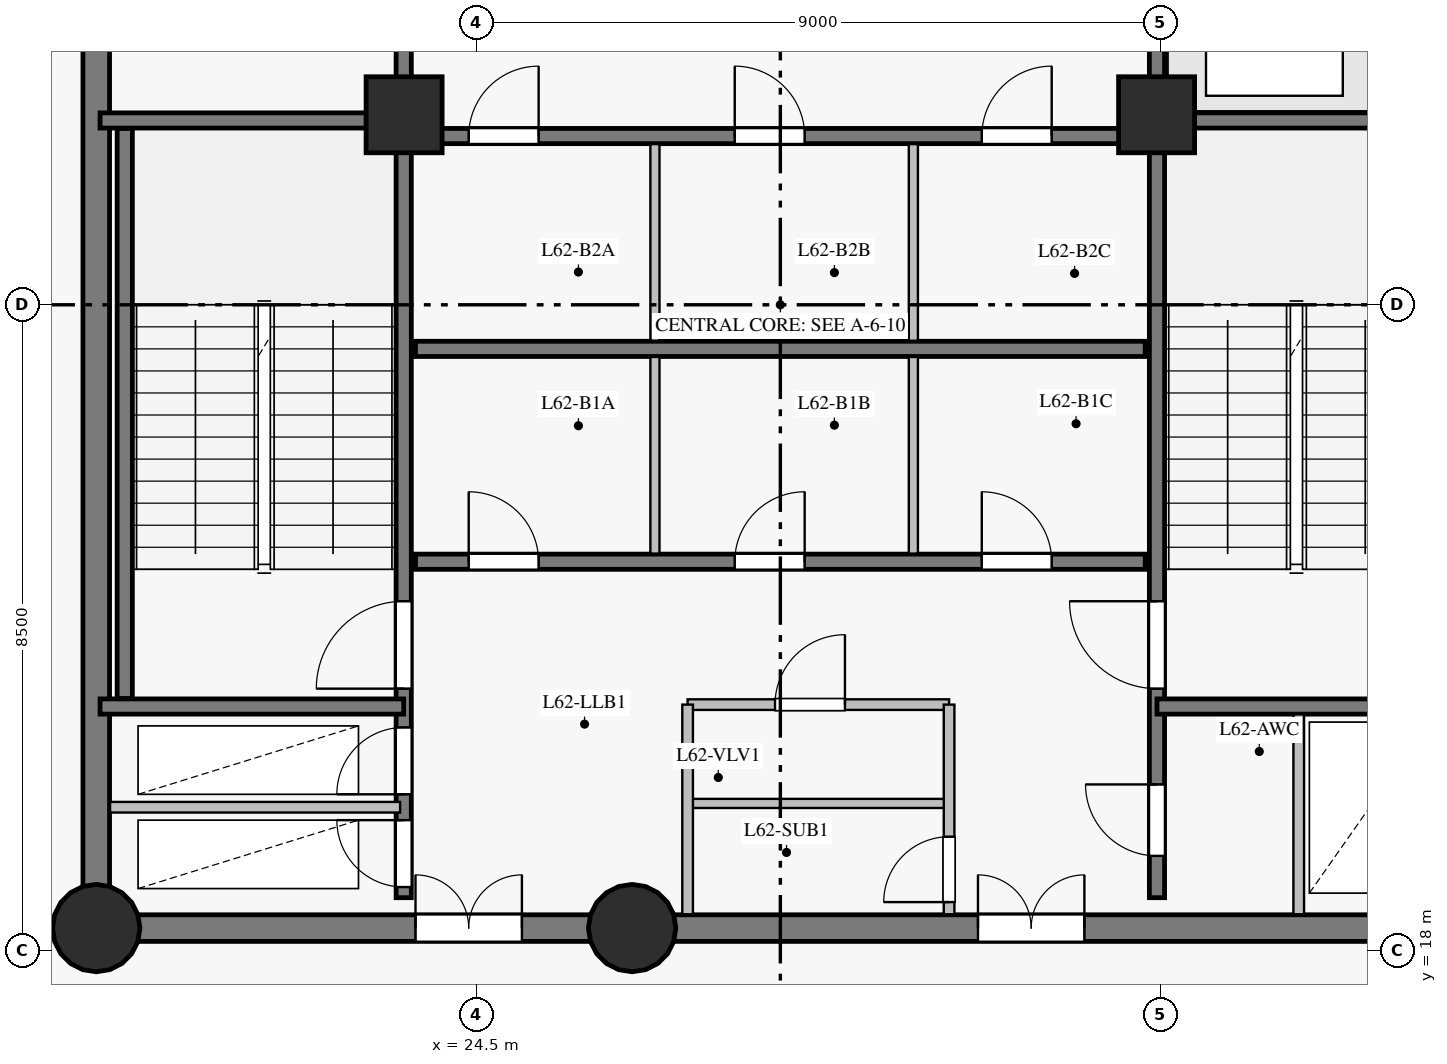
"""IFC4 building model, lengths in metres.
Left out: names, types, materials, properties, quantities, classifications, styles, units other than length and angle.
Written with IfcOpenShell. Run it as: python <this file> out.ifc"""

import sys

from ifc_helpers import new_model, si_unit, direction, frame, frame_2d, origin, origin_with_axes, origin_2d, place, context, subcontext, project, spatial, rectangle, circle, extrude, source, transform, mapped, element, fill, save


model = new_model("IFC4")
c1 = context("Model", 3, precision=1e-05, world=origin(), true_north=direction((0.0, 1.0)))
c2 = subcontext(c1, "Body", "Model", "MODEL_VIEW")
j1 = project(units=[si_unit("LENGTHUNIT", "METRE"), si_unit("PLANEANGLEUNIT", "RADIAN")], contexts=[c1])
p1 = place(None, origin())
s1 = spatial("IfcSite", under=j1, at=p1, CompositionType="ELEMENT")
p2 = place(p1, origin())
s2 = spatial("IfcBuilding", under=s1, at=p2, CompositionType="ELEMENT")
p3 = place(p2, frame((0.0, 0.0, 212.9)))
s3 = spatial("IfcBuildingStorey", under=s2, at=p3, CompositionType="ELEMENT", Elevation=212.9)
p4 = place(p3, frame((19.5, 18.3, 0.0), z_axis=(0.0, 0.0, 1.0), x_axis=(1.0, 0.0, 0.0)))
e1 = element("IfcWall", 1, at=p4, inside=s3, PredefinedType="SHEAR", context=c2, shape_type="SweptSolid", body=[
    extrude(rectangle(XDim=7.05, YDim=0.35, at=frame_2d((3.525, 0.0))), origin(), (0.0, 0.0, 1.0), 3.8),
])
p5 = place(p4, frame((4.2, 0.0, 0.0)))
e2 = element("IfcOpeningElement", 2, at=p5, cuts=e1, PredefinedType="OPENING", context=c2, shape_type="SweptSolid", body=[
    extrude(rectangle(XDim=1.4, YDim=2.2, at=frame_2d((0.7, 1.1))), frame((0.0, 0.185, 0.0), z_axis=(0.0, -1.0, 0.0), x_axis=(1.0, 0.0, 0.0)), (0.0, 0.0, 1.0), 0.37),
])
p6 = place(p3, frame((26.55, 18.3, 0.0), z_axis=(0.0, 0.0, 1.0), x_axis=(1.0, 0.0, 0.0)))
e3 = element("IfcWall", 3, at=p6, inside=s3, PredefinedType="SHEAR", context=c2, shape_type="SweptSolid", body=[
    extrude(rectangle(XDim=10.95, YDim=0.35, at=frame_2d((5.475, 0.0))), origin(), (0.0, 0.0, 1.0), 3.8),
])
p7 = place(p6, frame((4.55, 0.0, 0.0)))
e4 = element("IfcOpeningElement", 4, at=p7, cuts=e3, PredefinedType="OPENING", context=c2, shape_type="SweptSolid", body=[
    extrude(rectangle(XDim=1.4, YDim=2.2, at=frame_2d((0.7, 1.1))), frame((0.0, 0.185, 0.0), z_axis=(0.0, -1.0, 0.0), x_axis=(1.0, 0.0, 0.0)), (0.0, 0.0, 1.0), 0.37),
])
p8 = place(p3, frame((19.5, 34.7, 0.0), z_axis=(0.0, 0.0, 1.0), x_axis=(0.0, -1.0, 0.0)))
e5 = element("IfcWall", 5, at=p8, inside=s3, PredefinedType="SHEAR", context=c2, shape_type="SweptSolid", body=[
    extrude(rectangle(XDim=16.4, YDim=0.35, at=frame_2d((8.2, 0.0))), origin(), (0.0, 0.0, 1.0), 3.8),
])
p9 = place(p8, frame((3.24, 0.0, 0.0)))
e6 = element("IfcOpeningElement", 6, at=p9, cuts=e5, PredefinedType="OPENING", context=c2, shape_type="SweptSolid", body=[
    extrude(rectangle(XDim=1.1, YDim=2.15, at=frame_2d((0.55, 1.075))), frame((0.0, 0.185, 0.0), z_axis=(0.0, -1.0, 0.0), x_axis=(1.0, 0.0, 0.0)), (0.0, 0.0, 1.0), 0.37),
])
m1 = source(origin_with_axes(), c2, "Body", "SweptSolid", [
    extrude(circle(Radius=0.575, at=origin_2d()), origin(), (0.0, 0.0, 1.0), 4.0),
])
for number, where, z_axis, x_axis in (
    (7, (19.5, 18.3, 0.0), (0.0, 0.0, 1.0), (1.0, 0.0, 0.0)),
    (8, (26.55, 18.3, 0.0), (0.0, 0.0, 1.0), (1.0, 0.0, 0.0)),
):
    element("IfcColumn", number, at=place(p3, frame(where, z_axis=z_axis, x_axis=x_axis)), inside=s3, PredefinedType="COLUMN", context=c2, shape_type="MappedRepresentation", body=[
        mapped(m1, transform((0.0, 0.0, 0.0), scale=1.0)),
    ])
m2 = source(origin_with_axes(), c2, "Body", "SweptSolid", [
    extrude(rectangle(XDim=1.0, YDim=1.0, at=origin_2d()), origin(), (0.0, 0.0, 1.0), 4.0),
])
for number, where, z_axis, x_axis in (
    (9, (23.55, 29.0, 0.0), (0.0, 0.0, 1.0), (1.0, 0.0, 0.0)),
    (10, (33.45, 29.0, 0.0), (0.0, 0.0, 1.0), (1.0, 0.0, 0.0)),
):
    element("IfcColumn", number, at=place(p3, frame(where, z_axis=z_axis, x_axis=x_axis)), inside=s3, PredefinedType="COLUMN", context=c2, shape_type="MappedRepresentation", body=[
        mapped(m2, transform((0.0, 0.0, 0.0), scale=1.0)),
    ])
p10 = place(p3, frame((23.545, 18.7, 0.0), z_axis=(0.0, 0.0, 1.0), x_axis=(0.0, 1.0, 0.0)))
e11 = element("IfcWall", 11, at=p10, inside=s3, PredefinedType="SHEAR", context=c2, shape_type="SweptSolid", body=[
    extrude(rectangle(XDim=15.6, YDim=0.2, at=frame_2d((7.8, 0.0))), origin(), (0.0, 0.0, 1.0), 3.8),
])
p11 = place(p10, frame((2.75, 0.0, 0.0)))
e12 = element("IfcOpeningElement", 12, at=p11, cuts=e11, PredefinedType="OPENING", context=c2, shape_type="SweptSolid", body=[
    extrude(rectangle(XDim=1.15, YDim=2.15, at=frame_2d((0.575, 1.075))), frame((0.0, 0.11, 0.0), z_axis=(0.0, -1.0, 0.0), x_axis=(1.0, 0.0, 0.0)), (0.0, 0.0, 1.0), 0.22),
])
p12 = place(p10, frame((0.14, 0.0, 0.0)))
e13 = element("IfcOpeningElement", 13, at=p12, cuts=e11, PredefinedType="OPENING", context=c2, shape_type="SweptSolid", body=[
    extrude(rectangle(XDim=0.88, YDim=2.1, at=frame_2d((0.44, 1.05))), frame((0.0, 0.11, 0.0), z_axis=(0.0, -1.0, 0.0), x_axis=(1.0, 0.0, 0.0)), (0.0, 0.0, 1.0), 0.22),
])
p13 = place(p10, frame((1.36, 0.0, 0.0)))
e14 = element("IfcOpeningElement", 14, at=p13, cuts=e11, PredefinedType="OPENING", context=c2, shape_type="SweptSolid", body=[
    extrude(rectangle(XDim=0.88, YDim=2.1, at=frame_2d((0.44, 1.05))), frame((0.0, 0.11, 0.0), z_axis=(0.0, -1.0, 0.0), x_axis=(1.0, 0.0, 0.0)), (0.0, 0.0, 1.0), 0.22),
])
p14 = place(p10, frame((12.1, 0.0, 0.0)))
e15 = element("IfcOpeningElement", 15, at=p14, cuts=e11, PredefinedType="OPENING", context=c2, shape_type="SweptSolid", body=[
    extrude(rectangle(XDim=1.12, YDim=2.15, at=frame_2d((0.56, 1.075))), frame((0.0, 0.11, 0.0), z_axis=(0.0, -1.0, 0.0), x_axis=(1.0, 0.0, 0.0)), (0.0, 0.0, 1.0), 0.22),
])
p15 = place(p10, frame((14.05, 0.0, 0.0)))
e16 = element("IfcOpeningElement", 16, at=p15, cuts=e11, PredefinedType="OPENING", context=c2, shape_type="SweptSolid", body=[
    extrude(rectangle(XDim=1.12, YDim=2.15, at=frame_2d((0.56, 1.075))), frame((0.0, 0.11, 0.0), z_axis=(0.0, -1.0, 0.0), x_axis=(1.0, 0.0, 0.0)), (0.0, 0.0, 1.0), 0.22),
])
p16 = place(p3, frame((33.455, 18.7, 0.0), z_axis=(0.0, 0.0, 1.0), x_axis=(0.0, 1.0, 0.0)))
e17 = element("IfcWall", 17, at=p16, inside=s3, PredefinedType="SHEAR", context=c2, shape_type="SweptSolid", body=[
    extrude(rectangle(XDim=15.6, YDim=0.2, at=frame_2d((7.8, 0.0))), origin(), (0.0, 0.0, 1.0), 3.8),
])
p17 = place(p16, frame((2.75, 0.0, 0.0)))
e18 = element("IfcOpeningElement", 18, at=p17, cuts=e17, PredefinedType="OPENING", context=c2, shape_type="SweptSolid", body=[
    extrude(rectangle(XDim=1.15, YDim=2.15, at=frame_2d((0.575, 1.075))), frame((0.0, 0.11, 0.0), z_axis=(0.0, -1.0, 0.0), x_axis=(1.0, 0.0, 0.0)), (0.0, 0.0, 1.0), 0.22),
])
p18 = place(p16, frame((0.55, 0.0, 0.0)))
e19 = element("IfcOpeningElement", 19, at=p18, cuts=e17, PredefinedType="OPENING", context=c2, shape_type="SweptSolid", body=[
    extrude(rectangle(XDim=0.94, YDim=2.1, at=frame_2d((0.47, 1.05))), frame((0.0, 0.11, 0.0), z_axis=(0.0, -1.0, 0.0), x_axis=(1.0, 0.0, 0.0)), (0.0, 0.0, 1.0), 0.22),
])
p19 = place(p3, frame((23.7, 23.12, 0.0), z_axis=(0.0, 0.0, 1.0), x_axis=(1.0, 0.0, 0.0)))
e20 = element("IfcWall", 20, at=p19, inside=s3, PredefinedType="SHEAR", context=c2, shape_type="SweptSolid", body=[
    extrude(rectangle(XDim=9.6, YDim=0.2, at=frame_2d((4.8, 0.0))), origin(), (0.0, 0.0, 1.0), 3.8),
])
p20 = place(p19, frame((0.7, 0.0, 0.0)))
e21 = element("IfcOpeningElement", 21, at=p20, cuts=e20, PredefinedType="OPENING", context=c2, shape_type="SweptSolid", body=[
    extrude(rectangle(XDim=0.92, YDim=2.1, at=frame_2d((0.46, 1.05))), frame((0.0, 0.11, 0.0), z_axis=(0.0, -1.0, 0.0), x_axis=(1.0, 0.0, 0.0)), (0.0, 0.0, 1.0), 0.22),
])
p21 = place(p19, frame((4.2, 0.0, 0.0)))
e22 = element("IfcOpeningElement", 22, at=p21, cuts=e20, PredefinedType="OPENING", context=c2, shape_type="SweptSolid", body=[
    extrude(rectangle(XDim=0.92, YDim=2.1, at=frame_2d((0.46, 1.05))), frame((0.0, 0.11, 0.0), z_axis=(0.0, -1.0, 0.0), x_axis=(1.0, 0.0, 0.0)), (0.0, 0.0, 1.0), 0.22),
])
p22 = place(p19, frame((7.45, 0.0, 0.0)))
e23 = element("IfcOpeningElement", 23, at=p22, cuts=e20, PredefinedType="OPENING", context=c2, shape_type="SweptSolid", body=[
    extrude(rectangle(XDim=0.92, YDim=2.1, at=frame_2d((0.46, 1.05))), frame((0.0, 0.11, 0.0), z_axis=(0.0, -1.0, 0.0), x_axis=(1.0, 0.0, 0.0)), (0.0, 0.0, 1.0), 0.22),
])
p23 = place(p3, frame((23.7, 25.92, 0.0), z_axis=(0.0, 0.0, 1.0), x_axis=(1.0, 0.0, 0.0)))
e24 = element("IfcWall", 24, at=p23, inside=s3, PredefinedType="SHEAR", context=c2, shape_type="SweptSolid", body=[
    extrude(rectangle(XDim=9.6, YDim=0.2, at=frame_2d((4.8, 0.0))), origin(), (0.0, 0.0, 1.0), 3.8),
])
p24 = place(p3, frame((23.7, 28.72, 0.0), z_axis=(0.0, 0.0, 1.0), x_axis=(1.0, 0.0, 0.0)))
e25 = element("IfcWall", 25, at=p24, inside=s3, PredefinedType="SHEAR", context=c2, shape_type="SweptSolid", body=[
    extrude(rectangle(XDim=9.6, YDim=0.2, at=frame_2d((4.8, 0.0))), origin(), (0.0, 0.0, 1.0), 3.8),
])
p25 = place(p24, frame((0.7, 0.0, 0.0)))
e26 = element("IfcOpeningElement", 26, at=p25, cuts=e25, PredefinedType="OPENING", context=c2, shape_type="SweptSolid", body=[
    extrude(rectangle(XDim=0.92, YDim=2.1, at=frame_2d((0.46, 1.05))), frame((0.0, 0.11, 0.0), z_axis=(0.0, -1.0, 0.0), x_axis=(1.0, 0.0, 0.0)), (0.0, 0.0, 1.0), 0.22),
])
p26 = place(p24, frame((4.2, 0.0, 0.0)))
e27 = element("IfcOpeningElement", 27, at=p26, cuts=e25, PredefinedType="OPENING", context=c2, shape_type="SweptSolid", body=[
    extrude(rectangle(XDim=0.92, YDim=2.1, at=frame_2d((0.46, 1.05))), frame((0.0, 0.11, 0.0), z_axis=(0.0, -1.0, 0.0), x_axis=(1.0, 0.0, 0.0)), (0.0, 0.0, 1.0), 0.22),
])
p27 = place(p24, frame((7.45, 0.0, 0.0)))
e28 = element("IfcOpeningElement", 28, at=p27, cuts=e25, PredefinedType="OPENING", context=c2, shape_type="SweptSolid", body=[
    extrude(rectangle(XDim=0.92, YDim=2.1, at=frame_2d((0.46, 1.05))), frame((0.0, 0.11, 0.0), z_axis=(0.0, -1.0, 0.0), x_axis=(1.0, 0.0, 0.0)), (0.0, 0.0, 1.0), 0.22),
])
p28 = place(p3, frame((19.875, 21.32, 0.0), z_axis=(0.0, 0.0, 1.0), x_axis=(0.0, 1.0, 0.0)))
e29 = element("IfcWall", 29, at=p28, inside=s3, PredefinedType="SHEAR", context=c2, shape_type="SweptSolid", body=[
    extrude(rectangle(XDim=7.5, YDim=0.2, at=frame_2d((3.75, 0.0))), origin(), (0.0, 0.0, 1.0), 3.8),
])
for number, where, z_axis, x_axis in (
    (30, (33.455, 21.215, 0.0), (0.0, 0.0, 1.0), (1.0, 0.0, 0.0)),
    (31, (33.455, 28.925, 0.0), (0.0, 0.0, 1.0), (1.0, 0.0, 0.0)),
    (32, (19.55, 21.215, 0.0), (0.0, 0.0, 1.0), (1.0, 0.0, 0.0)),
    (33, (19.55, 28.925, 0.0), (0.0, 0.0, 1.0), (1.0, 0.0, 0.0)),
):
    element("IfcWall", number, at=place(p3, frame(where, z_axis=z_axis, x_axis=x_axis)), inside=s3, PredefinedType="SHEAR", context=c2, shape_type="SweptSolid", body=[
        extrude(rectangle(XDim=3.995, YDim=0.2, at=frame_2d((1.998, 0.0))), origin(), (0.0, 0.0, 1.0), 3.8),
    ])
p29 = place(p3, frame((19.682, 19.89, 0.0), z_axis=(0.0, 0.0, 1.0), x_axis=(1.0, 0.0, 0.0)))
e34 = element("IfcWall", 34, at=p29, inside=s3, PredefinedType="PARTITIONING", context=c2, shape_type="SweptSolid", body=[
    extrude(rectangle(XDim=3.815, YDim=0.14, at=frame_2d((1.908, 0.0))), origin(), (0.0, 0.0, 1.0), 3.8),
])
p30 = place(p3, frame((27.28, 21.24, 0.0), z_axis=(0.0, 0.0, 1.0), x_axis=(1.0, 0.0, 0.0)))
e35 = element("IfcWall", 35, at=p30, inside=s3, PredefinedType="PARTITIONING", context=c2, shape_type="SweptSolid", body=[
    extrude(rectangle(XDim=3.44, YDim=0.14, at=frame_2d((1.72, 0.0))), origin(), (0.0, 0.0, 1.0), 3.8),
])
p31 = place(p30, frame((1.15, 0.0, 0.0)))
e36 = element("IfcOpeningElement", 36, at=p31, cuts=e35, PredefinedType="OPENING", context=c2, shape_type="SweptSolid", body=[
    extrude(rectangle(XDim=0.92, YDim=2.1, at=frame_2d((0.46, 1.05))), frame((0.0, 0.08, 0.0), z_axis=(0.0, -1.0, 0.0), x_axis=(1.0, 0.0, 0.0)), (0.0, 0.0, 1.0), 0.16),
])
p32 = place(p3, frame((27.28, 19.94, 0.0), z_axis=(0.0, 0.0, 1.0), x_axis=(1.0, 0.0, 0.0)))
e37 = element("IfcWall", 37, at=p32, inside=s3, PredefinedType="PARTITIONING", context=c2, shape_type="SweptSolid", body=[
    extrude(rectangle(XDim=3.44, YDim=0.12, at=frame_2d((1.72, 0.0))), origin(), (0.0, 0.0, 1.0), 3.8),
])
p33 = place(p3, frame((27.28, 18.482, 0.0), z_axis=(0.0, 0.0, 1.0), x_axis=(0.0, 1.0, 0.0)))
e38 = element("IfcWall", 38, at=p33, inside=s3, PredefinedType="PARTITIONING", context=c2, shape_type="SweptSolid", body=[
    extrude(rectangle(XDim=2.758, YDim=0.14, at=frame_2d((1.379, 0.0))), origin(), (0.0, 0.0, 1.0), 3.8),
])
p34 = place(p3, frame((30.72, 18.482, 0.0), z_axis=(0.0, 0.0, 1.0), x_axis=(0.0, 1.0, 0.0)))
e39 = element("IfcWall", 39, at=p34, inside=s3, PredefinedType="PARTITIONING", context=c2, shape_type="SweptSolid", body=[
    extrude(rectangle(XDim=2.758, YDim=0.14, at=frame_2d((1.379, 0.0))), origin(), (0.0, 0.0, 1.0), 3.8),
])
p35 = place(p34, frame((0.16, 0.0, 0.0)))
e40 = element("IfcOpeningElement", 40, at=p35, cuts=e39, PredefinedType="OPENING", context=c2, shape_type="SweptSolid", body=[
    extrude(rectangle(XDim=0.86, YDim=2.1, at=frame_2d((0.43, 1.05))), frame((0.0, 0.08, 0.0), z_axis=(0.0, -1.0, 0.0), x_axis=(1.0, 0.0, 0.0)), (0.0, 0.0, 1.0), 0.16),
])
for number, where, z_axis, x_axis in (
    (41, (26.85, 23.227, 0.0), (0.0, 0.0, 1.0), (0.0, 1.0, 0.0)),
    (42, (30.25, 23.227, 0.0), (0.0, 0.0, 1.0), (0.0, 1.0, 0.0)),
    (43, (26.85, 26.027, 0.0), (0.0, 0.0, 1.0), (0.0, 1.0, 0.0)),
    (44, (30.25, 26.027, 0.0), (0.0, 0.0, 1.0), (0.0, 1.0, 0.0)),
):
    element("IfcWall", number, at=place(p3, frame(where, z_axis=z_axis, x_axis=x_axis)), inside=s3, PredefinedType="PARTITIONING", context=c2, shape_type="SweptSolid", body=[
        extrude(rectangle(XDim=2.587, YDim=0.12, at=frame_2d((1.293, 0.0))), origin(), (0.0, 0.0, 1.0), 3.8),
    ])
p36 = place(p3, frame((35.32, 18.482, 0.0), z_axis=(0.0, 0.0, 1.0), x_axis=(0.0, 1.0, 0.0)))
e45 = element("IfcWall", 45, at=p36, inside=s3, PredefinedType="PARTITIONING", context=c2, shape_type="SweptSolid", body=[
    extrude(rectangle(XDim=2.629, YDim=0.14, at=frame_2d((1.314, 0.0))), origin(), (0.0, 0.0, 1.0), 3.8),
])
m3 = source(origin_with_axes(), c2, "Body", "SweptSolid", [
    extrude(rectangle(XDim=1.15, YDim=2.15, at=frame_2d((0.575, 1.075))), frame((0.0, 0.025, 0.0), z_axis=(0.0, -1.0, 0.0), x_axis=(1.0, 0.0, 0.0)), (0.0, 0.0, 1.0), 0.05),
])
p37 = place(p11, origin())
e46 = element("IfcDoor", 46, at=p37, inside=s3, OperationType="SINGLE_SWING_LEFT", PredefinedType="DOOR", context=c2, shape_type="MappedRepresentation", body=[
    mapped(m3, transform((0.0, 0.0, 0.0), scale=1.0)),
])
fill(e12, e46)
p38 = place(p17, origin())
e47 = element("IfcDoor", 47, at=p38, inside=s3, OperationType="SINGLE_SWING_RIGHT", PredefinedType="DOOR", context=c2, shape_type="MappedRepresentation", body=[
    mapped(m3, transform((0.0, 0.0, 0.0), scale=1.0)),
])
fill(e18, e47)
m4 = source(origin_with_axes(), c2, "Body", "SweptSolid", [
    extrude(rectangle(XDim=0.88, YDim=2.1, at=frame_2d((0.44, 1.05))), frame((0.0, 0.025, 0.0), z_axis=(0.0, -1.0, 0.0), x_axis=(1.0, 0.0, 0.0)), (0.0, 0.0, 1.0), 0.05),
])
p39 = place(p12, origin())
e48 = element("IfcDoor", 48, at=p39, inside=s3, OperationType="SINGLE_SWING_RIGHT", PredefinedType="DOOR", context=c2, shape_type="MappedRepresentation", body=[
    mapped(m4, transform((0.0, 0.0, 0.0), scale=1.0)),
])
fill(e13, e48)
p40 = place(p13, origin())
e49 = element("IfcDoor", 49, at=p40, inside=s3, OperationType="SINGLE_SWING_LEFT", PredefinedType="DOOR", context=c2, shape_type="MappedRepresentation", body=[
    mapped(m4, transform((0.0, 0.0, 0.0), scale=1.0)),
])
fill(e14, e49)
m5 = source(origin_with_axes(), c2, "Body", "SweptSolid", [
    extrude(rectangle(XDim=1.4, YDim=2.2, at=frame_2d((0.7, 1.1))), frame((0.0, 0.025, 0.0), z_axis=(0.0, -1.0, 0.0), x_axis=(1.0, 0.0, 0.0)), (0.0, 0.0, 1.0), 0.05),
])
p41 = place(p5, origin())
e50 = element("IfcDoor", 50, at=p41, inside=s3, OperationType="DOUBLE_DOOR_SINGLE_SWING", PredefinedType="DOOR", context=c2, shape_type="MappedRepresentation", body=[
    mapped(m5, transform((0.0, 0.0, 0.0), scale=1.0)),
])
fill(e2, e50)
p42 = place(p7, origin())
e51 = element("IfcDoor", 51, at=p42, inside=s3, OperationType="DOUBLE_DOOR_SINGLE_SWING", PredefinedType="DOOR", context=c2, shape_type="MappedRepresentation", body=[
    mapped(m5, transform((0.0, 0.0, 0.0), scale=1.0)),
])
fill(e4, e51)
m6 = source(origin_with_axes(), c2, "Body", "SweptSolid", [
    extrude(rectangle(XDim=0.94, YDim=2.1, at=frame_2d((0.47, 1.05))), frame((0.0, 0.025, 0.0), z_axis=(0.0, -1.0, 0.0), x_axis=(1.0, 0.0, 0.0)), (0.0, 0.0, 1.0), 0.05),
])
p43 = place(p18, origin())
e52 = element("IfcDoor", 52, at=p43, inside=s3, OperationType="SINGLE_SWING_RIGHT", PredefinedType="DOOR", context=c2, shape_type="MappedRepresentation", body=[
    mapped(m6, transform((0.0, 0.0, 0.0), scale=1.0)),
])
fill(e19, e52)
m7 = source(origin_with_axes(), c2, "Body", "SweptSolid", [
    extrude(rectangle(XDim=0.86, YDim=2.1, at=frame_2d((0.43, 1.05))), frame((0.0, 0.025, 0.0), z_axis=(0.0, -1.0, 0.0), x_axis=(1.0, 0.0, 0.0)), (0.0, 0.0, 1.0), 0.05),
])
p44 = place(p35, origin())
e53 = element("IfcDoor", 53, at=p44, inside=s3, OperationType="SINGLE_SWING_LEFT", PredefinedType="DOOR", context=c2, shape_type="MappedRepresentation", body=[
    mapped(m7, transform((0.0, 0.0, 0.0), scale=1.0)),
])
fill(e40, e53)
m8 = source(origin_with_axes(), c2, "Body", "SweptSolid", [
    extrude(rectangle(XDim=0.92, YDim=2.1, at=frame_2d((0.46, 1.05))), frame((0.0, 0.025, 0.0), z_axis=(0.0, -1.0, 0.0), x_axis=(1.0, 0.0, 0.0)), (0.0, 0.0, 1.0), 0.05),
])
p45 = place(p31, origin())
e54 = element("IfcDoor", 54, at=p45, inside=s3, OperationType="SINGLE_SWING_RIGHT", PredefinedType="DOOR", context=c2, shape_type="MappedRepresentation", body=[
    mapped(m8, transform((0.0, 0.0, 0.0), scale=1.0)),
])
fill(e36, e54)
p46 = place(p20, origin())
e55 = element("IfcDoor", 55, at=p46, inside=s3, OperationType="SINGLE_SWING_LEFT", PredefinedType="DOOR", context=c2, shape_type="MappedRepresentation", body=[
    mapped(m8, transform((0.0, 0.0, 0.0), scale=1.0)),
])
fill(e21, e55)
p47 = place(p21, origin())
e56 = element("IfcDoor", 56, at=p47, inside=s3, OperationType="SINGLE_SWING_RIGHT", PredefinedType="DOOR", context=c2, shape_type="MappedRepresentation", body=[
    mapped(m8, transform((0.0, 0.0, 0.0), scale=1.0)),
])
fill(e22, e56)
p48 = place(p22, origin())
e57 = element("IfcDoor", 57, at=p48, inside=s3, OperationType="SINGLE_SWING_LEFT", PredefinedType="DOOR", context=c2, shape_type="MappedRepresentation", body=[
    mapped(m8, transform((0.0, 0.0, 0.0), scale=1.0)),
])
fill(e23, e57)
p49 = place(p25, origin())
e58 = element("IfcDoor", 58, at=p49, inside=s3, OperationType="SINGLE_SWING_RIGHT", PredefinedType="DOOR", context=c2, shape_type="MappedRepresentation", body=[
    mapped(m8, transform((0.0, 0.0, 0.0), scale=1.0)),
])
fill(e26, e58)
p50 = place(p26, origin())
e59 = element("IfcDoor", 59, at=p50, inside=s3, OperationType="SINGLE_SWING_LEFT", PredefinedType="DOOR", context=c2, shape_type="MappedRepresentation", body=[
    mapped(m8, transform((0.0, 0.0, 0.0), scale=1.0)),
])
fill(e27, e59)
p51 = place(p27, origin())
e60 = element("IfcDoor", 60, at=p51, inside=s3, OperationType="SINGLE_SWING_RIGHT", PredefinedType="DOOR", context=c2, shape_type="MappedRepresentation", body=[
    mapped(m8, transform((0.0, 0.0, 0.0), scale=1.0)),
])
fill(e28, e60)
save(model, sys.argv[1])
